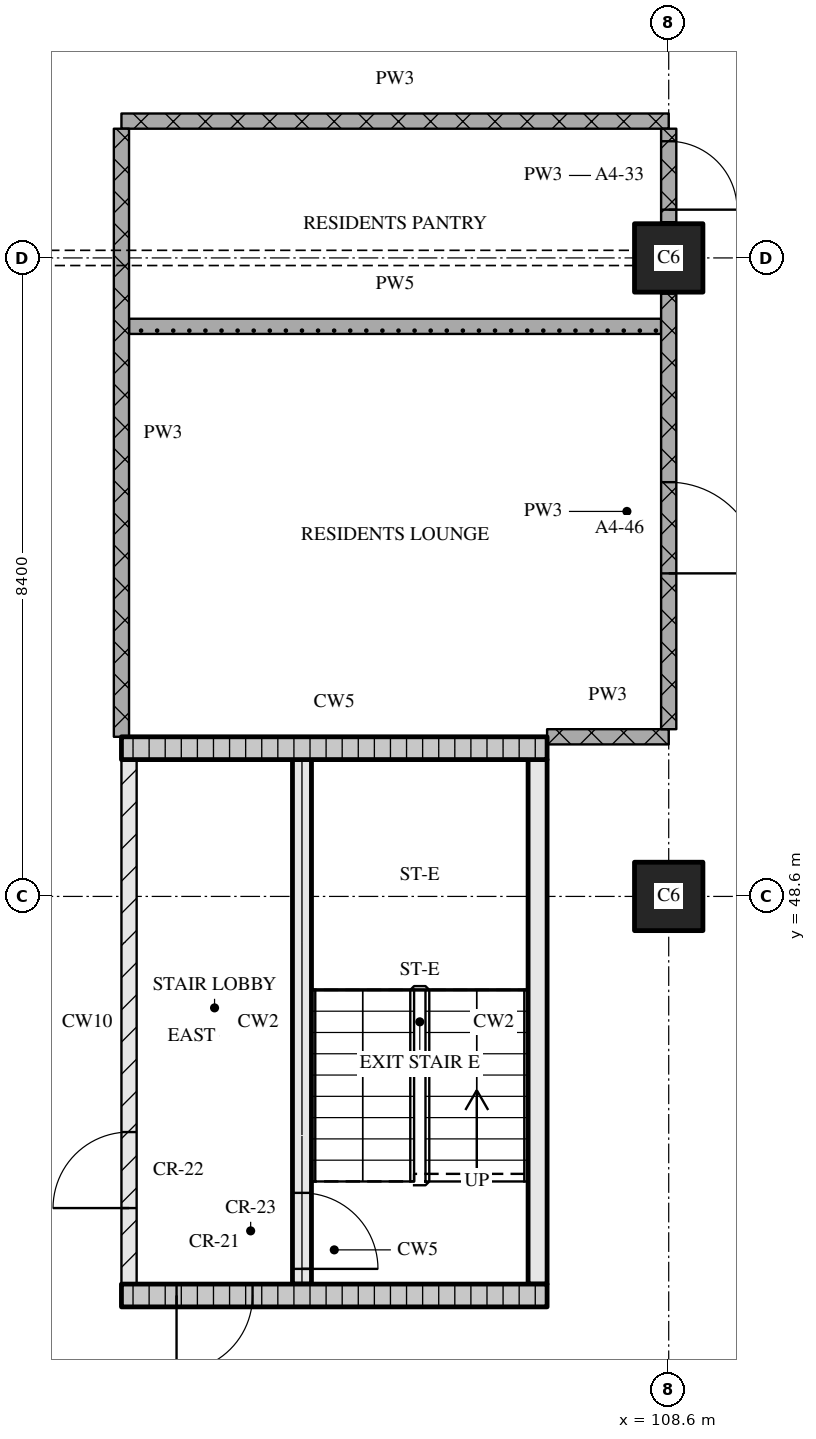
"""IFC4 building model, lengths in metres.
Left out: names, types, materials, properties, quantities, classifications, styles, units other than length and angle.
Written with IfcOpenShell. Run it as: python <this file> out.ifc"""

import sys

from ifc_helpers import new_model, si_unit, direction, frame, frame_2d, origin, origin_2d, place, context, subcontext, project, spatial, rectangle, extrude, element, fill, save


model = new_model("IFC4")
c1 = context("Model", 3, precision=1e-05, world=origin(), true_north=direction((0.0, 1.0)))
c2 = subcontext(c1, "Body", "Model", "MODEL_VIEW")
j1 = project(units=[si_unit("LENGTHUNIT", "METRE"), si_unit("PLANEANGLEUNIT", "RADIAN")], contexts=[c1])
p1 = place(None, origin())
s1 = spatial("IfcSite", under=j1, at=p1, CompositionType="ELEMENT")
p2 = place(p1, origin())
s2 = spatial("IfcBuilding", under=s1, at=p2, CompositionType="ELEMENT")
p3 = place(p2, frame((0.0, 0.0, 76.8)))
s3 = spatial("IfcBuildingStorey", under=s2, at=p3, CompositionType="ELEMENT", Elevation=76.8)
for number, where, z_axis, x_axis in (
    (1, (108.6, 48.6, 0.0), (0.0, 0.0, 1.0), (1.0, 0.0, 0.0)),
    (2, (108.6, 57.0, 0.0), (0.0, 0.0, 1.0), (1.0, 0.0, 0.0)),
):
    element("IfcColumn", number, at=place(p3, frame(where, z_axis=z_axis, x_axis=x_axis)), inside=s3, PredefinedType="COLUMN", context=c2, shape_type="SweptSolid", body=[
        extrude(rectangle(XDim=0.9, YDim=0.9, at=origin_2d()), origin(), (0.0, 0.0, 1.0), 3.6),
    ])
p4 = place(p3, frame((101.4, 43.35, 0.0), z_axis=(0.0, 0.0, 1.0), x_axis=(1.0, 0.0, 0.0)))
e3 = element("IfcWall", 3, at=p4, inside=s3, PredefinedType="SOLIDWALL", context=c2, shape_type="SweptSolid", body=[
    extrude(rectangle(XDim=5.6, YDim=0.3, at=frame_2d((2.8, 0.0))), origin(), (0.0, 0.0, 1.0), 3.32),
])
p5 = place(p4, frame((0.725, 0.0, 0.0)))
e4 = element("IfcOpeningElement", 4, at=p5, cuts=e3, PredefinedType="OPENING", context=c2, shape_type="SweptSolid", body=[
    extrude(rectangle(XDim=1.0, YDim=2.1, at=frame_2d((0.5, 1.05))), frame((0.0, 0.16, 0.0), z_axis=(0.0, -1.0, 0.0), x_axis=(1.0, 0.0, 0.0)), (0.0, 0.0, 1.0), 0.32),
])
p6 = place(p3, frame((101.5, 43.5, 0.0), z_axis=(0.0, 0.0, 1.0), x_axis=(0.0, 1.0, 0.0)))
e5 = element("IfcWall", 5, at=p6, inside=s3, PredefinedType="PARTITIONING", context=c2, shape_type="SweptSolid", body=[
    extrude(rectangle(XDim=6.9, YDim=0.2, at=frame_2d((3.45, 0.0))), origin(), (0.0, 0.0, 1.0), 3.32),
])
p7 = place(p6, frame((1.0, 0.0, 0.0)))
e6 = element("IfcOpeningElement", 6, at=p7, cuts=e5, PredefinedType="OPENING", context=c2, shape_type="SweptSolid", body=[
    extrude(rectangle(XDim=1.0, YDim=2.1, at=frame_2d((0.5, 1.05))), frame((0.0, 0.11, 0.0), z_axis=(0.0, -1.0, 0.0), x_axis=(1.0, 0.0, 0.0)), (0.0, 0.0, 1.0), 0.22),
])
p8 = place(p3, frame((103.775, 43.5, 0.0), z_axis=(0.0, 0.0, 1.0), x_axis=(0.0, 1.0, 0.0)))
e7 = element("IfcWall", 7, at=p8, inside=s3, PredefinedType="SOLIDWALL", context=c2, shape_type="SweptSolid", body=[
    extrude(rectangle(XDim=6.9, YDim=0.25, at=frame_2d((3.45, 0.0))), origin(), (0.0, 0.0, 1.0), 3.32),
])
p9 = place(p8, frame((0.2, 0.0, 0.0)))
e8 = element("IfcOpeningElement", 8, at=p9, cuts=e7, PredefinedType="OPENING", context=c2, shape_type="SweptSolid", body=[
    extrude(rectangle(XDim=1.0, YDim=2.1, at=frame_2d((0.5, 1.05))), frame((0.0, 0.135, 0.0), z_axis=(0.0, -1.0, 0.0), x_axis=(1.0, 0.0, 0.0)), (0.0, 0.0, 1.0), 0.27),
])
p10 = place(p3, frame((106.875, 43.5, 0.0), z_axis=(0.0, 0.0, 1.0), x_axis=(0.0, 1.0, 0.0)))
e9 = element("IfcWall", 9, at=p10, inside=s3, PredefinedType="SOLIDWALL", context=c2, shape_type="SweptSolid", body=[
    extrude(rectangle(XDim=6.9, YDim=0.25, at=frame_2d((3.45, 0.0))), origin(), (0.0, 0.0, 1.0), 3.32),
])
p11 = place(p3, frame((101.4, 50.55, 0.0), z_axis=(0.0, 0.0, 1.0), x_axis=(1.0, 0.0, 0.0)))
e10 = element("IfcWall", 10, at=p11, inside=s3, PredefinedType="SOLIDWALL", context=c2, shape_type="SweptSolid", body=[
    extrude(rectangle(XDim=5.6, YDim=0.3, at=frame_2d((2.8, 0.0))), origin(), (0.0, 0.0, 1.0), 3.32),
])
p12 = place(p3, frame((107.0, 50.7, 0.0), z_axis=(0.0, 0.0, 1.0), x_axis=(1.0, 0.0, 0.0)))
e11 = element("IfcWall", 11, at=p12, inside=s3, PredefinedType="PARTITIONING", context=c2, shape_type="SweptSolid", body=[
    extrude(rectangle(XDim=1.6, YDim=0.2, at=frame_2d((0.8, 0.0))), origin(), (0.0, 0.0, 1.0), 3.32),
])
p13 = place(p3, frame((101.5, 56.1, 0.0), z_axis=(0.0, 0.0, 1.0), x_axis=(1.0, 0.0, 0.0)))
e12 = element("IfcWall", 12, at=p13, inside=s3, PredefinedType="PARTITIONING", context=c2, shape_type="SweptSolid", body=[
    extrude(rectangle(XDim=7.0, YDim=0.2, at=frame_2d((3.5, 0.0))), origin(), (0.0, 0.0, 1.0), 3.32),
])
p14 = place(p3, frame((101.4, 58.8, 0.0), z_axis=(0.0, 0.0, 1.0), x_axis=(1.0, 0.0, 0.0)))
e13 = element("IfcWall", 13, at=p14, inside=s3, PredefinedType="PARTITIONING", context=c2, shape_type="SweptSolid", body=[
    extrude(rectangle(XDim=7.2, YDim=0.2, at=frame_2d((3.6, 0.0))), origin(), (0.0, 0.0, 1.0), 3.32),
])
p15 = place(p3, frame((101.4, 58.7, 0.0), z_axis=(0.0, 0.0, 1.0), x_axis=(0.0, -1.0, 0.0)))
e14 = element("IfcWall", 14, at=p15, inside=s3, PredefinedType="PARTITIONING", context=c2, shape_type="SweptSolid", body=[
    extrude(rectangle(XDim=8.0, YDim=0.2, at=frame_2d((4.0, 0.0))), origin(), (0.0, 0.0, 1.0), 3.32),
])
p16 = place(p3, frame((108.6, 50.8, 0.0), z_axis=(0.0, 0.0, 1.0), x_axis=(0.0, 1.0, 0.0)))
e15 = element("IfcWall", 15, at=p16, inside=s3, PredefinedType="PARTITIONING", context=c2, shape_type="SweptSolid", body=[
    extrude(rectangle(XDim=5.73, YDim=0.2, at=frame_2d((2.865, 0.0))), origin(), (0.0, 0.0, 1.0), 3.32),
])
p17 = place(p16, frame((2.05, 0.0, 0.0)))
e16 = element("IfcOpeningElement", 16, at=p17, cuts=e15, PredefinedType="OPENING", context=c2, shape_type="SweptSolid", body=[
    extrude(rectangle(XDim=1.2, YDim=2.1, at=frame_2d((0.6, 1.05))), frame((0.0, 0.11, 0.0), z_axis=(0.0, -1.0, 0.0), x_axis=(1.0, 0.0, 0.0)), (0.0, 0.0, 1.0), 0.22),
])
p18 = place(p3, frame((108.6, 57.47, 0.0), z_axis=(0.0, 0.0, 1.0), x_axis=(0.0, 1.0, 0.0)))
e17 = element("IfcWall", 17, at=p18, inside=s3, PredefinedType="PARTITIONING", context=c2, shape_type="SweptSolid", body=[
    extrude(rectangle(XDim=1.23, YDim=0.2, at=frame_2d((0.615, 0.0))), origin(), (0.0, 0.0, 1.0), 3.32),
])
p19 = place(p18, frame((0.165, 0.0, 0.0)))
e18 = element("IfcOpeningElement", 18, at=p19, cuts=e17, PredefinedType="OPENING", context=c2, shape_type="SweptSolid", body=[
    extrude(rectangle(XDim=0.9, YDim=2.1, at=frame_2d((0.45, 1.05))), frame((0.0, 0.11, 0.0), z_axis=(0.0, -1.0, 0.0), x_axis=(1.0, 0.0, 0.0)), (0.0, 0.0, 1.0), 0.22),
])
p20 = place(p5, origin())
e19 = element("IfcDoor", 19, at=p20, inside=s3, OperationType="SINGLE_SWING_RIGHT", PredefinedType="DOOR", context=c2, shape_type="SweptSolid", body=[
    extrude(rectangle(XDim=1.0, YDim=2.1, at=frame_2d((0.5, 1.05))), frame((0.0, 0.025, 0.0), z_axis=(0.0, -1.0, 0.0), x_axis=(1.0, 0.0, 0.0)), (0.0, 0.0, 1.0), 0.05),
])
fill(e4, e19)
p21 = place(p9, origin())
e20 = element("IfcDoor", 20, at=p21, inside=s3, OperationType="SINGLE_SWING_RIGHT", PredefinedType="DOOR", context=c2, shape_type="SweptSolid", body=[
    extrude(rectangle(XDim=1.0, YDim=2.1, at=frame_2d((0.5, 1.05))), frame((0.0, 0.025, 0.0), z_axis=(0.0, -1.0, 0.0), x_axis=(1.0, 0.0, 0.0)), (0.0, 0.0, 1.0), 0.05),
])
fill(e8, e20)
p22 = place(p7, origin())
e21 = element("IfcDoor", 21, at=p22, inside=s3, OperationType="SINGLE_SWING_LEFT", PredefinedType="DOOR", context=c2, shape_type="SweptSolid", body=[
    extrude(rectangle(XDim=1.0, YDim=2.1, at=frame_2d((0.5, 1.05))), frame((0.0, 0.025, 0.0), z_axis=(0.0, -1.0, 0.0), x_axis=(1.0, 0.0, 0.0)), (0.0, 0.0, 1.0), 0.05),
])
fill(e6, e21)
p23 = place(p17, origin())
e22 = element("IfcDoor", 22, at=p23, inside=s3, OperationType="SINGLE_SWING_RIGHT", PredefinedType="DOOR", context=c2, shape_type="SweptSolid", body=[
    extrude(rectangle(XDim=1.2, YDim=2.1, at=frame_2d((0.6, 1.05))), frame((0.0, 0.025, 0.0), z_axis=(0.0, -1.0, 0.0), x_axis=(1.0, 0.0, 0.0)), (0.0, 0.0, 1.0), 0.05),
])
fill(e16, e22)
p24 = place(p19, origin())
e23 = element("IfcDoor", 23, at=p24, inside=s3, OperationType="SINGLE_SWING_RIGHT", PredefinedType="DOOR", context=c2, shape_type="SweptSolid", body=[
    extrude(rectangle(XDim=0.9, YDim=2.1, at=frame_2d((0.45, 1.05))), frame((0.0, 0.025, 0.0), z_axis=(0.0, -1.0, 0.0), x_axis=(1.0, 0.0, 0.0)), (0.0, 0.0, 1.0), 0.05),
])
fill(e18, e23)
save(model, sys.argv[1])
